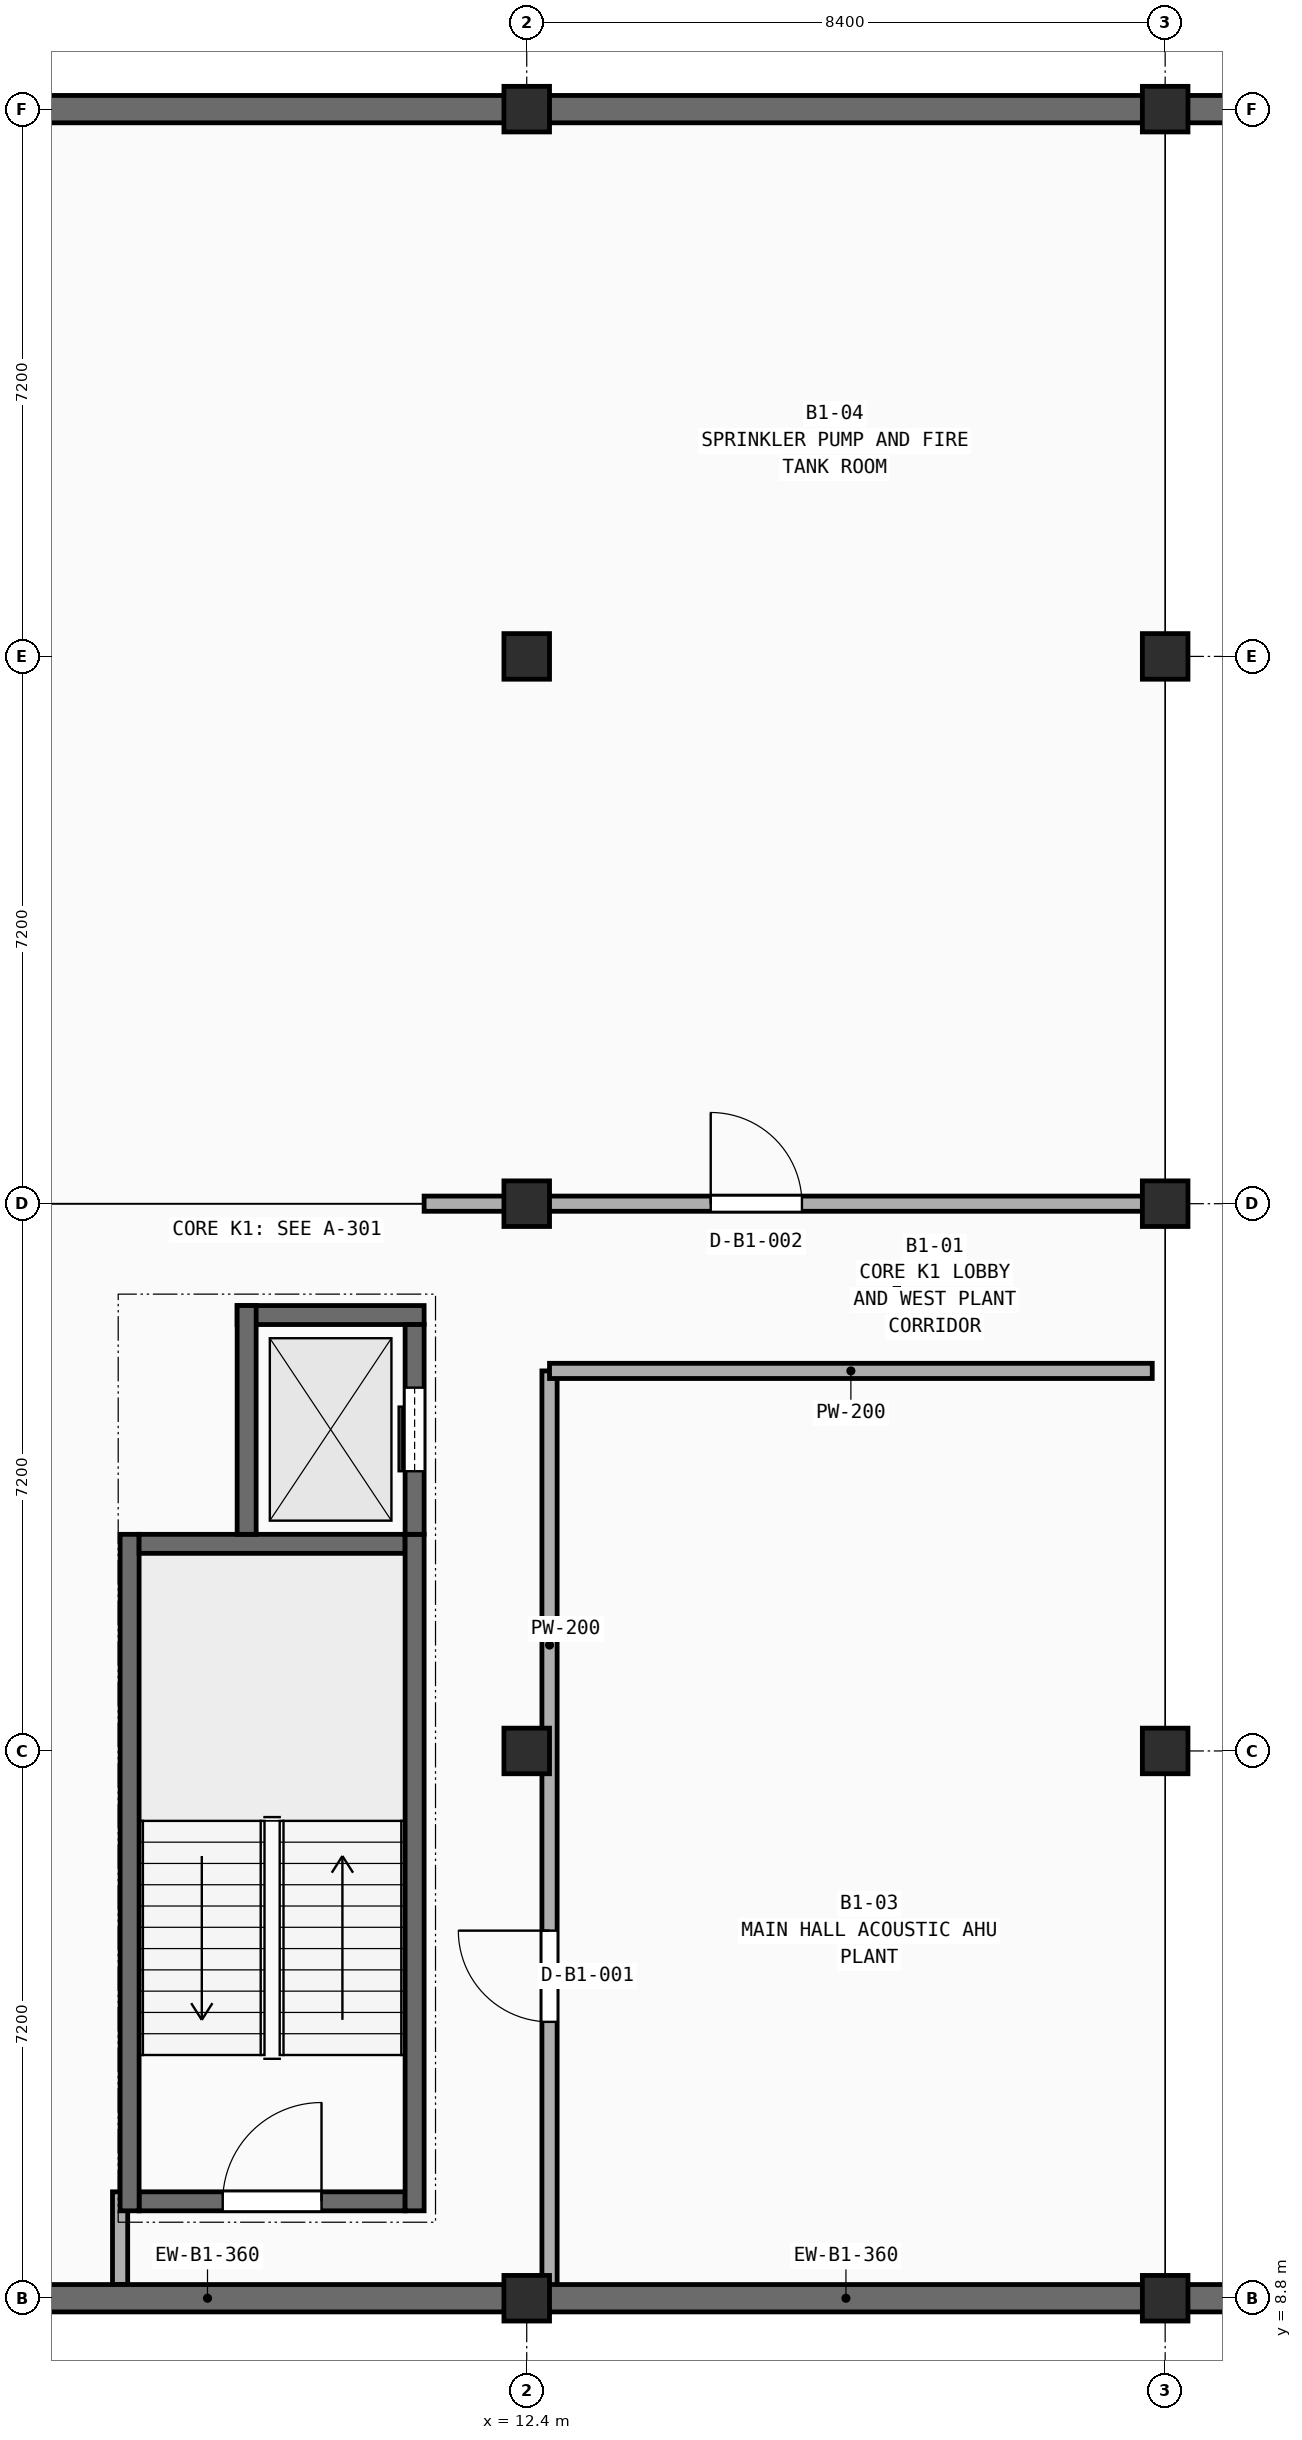
"""IFC4 building model, lengths in metres.
Left out: names, types, materials, properties, quantities, classifications, styles, units other than length and angle.
Written with IfcOpenShell. Run it as: python <this file> out.ifc"""

import sys

from ifc_helpers import new_model, si_unit, direction, frame, frame_2d, origin, origin_2d, place, context, subcontext, project, spatial, rectangle, extrude, element, fill, save


model = new_model("IFC4")
c1 = context("Model", 3, precision=1e-05, world=origin(), true_north=direction((0.0, 1.0)))
c2 = subcontext(c1, "Body", "Model", "MODEL_VIEW")
j1 = project(units=[si_unit("LENGTHUNIT", "METRE"), si_unit("PLANEANGLEUNIT", "RADIAN")], contexts=[c1])
p1 = place(None, origin())
s1 = spatial("IfcSite", under=j1, at=p1, CompositionType="ELEMENT")
p2 = place(p1, origin())
s2 = spatial("IfcBuilding", under=s1, at=p2, CompositionType="ELEMENT")
p3 = place(p2, frame((0.0, 0.0, -4.2)))
s3 = spatial("IfcBuildingStorey", under=s2, at=p3, CompositionType="ELEMENT", Elevation=-4.2)
for number, where, z_axis, x_axis in (
    (1, (12.4, 8.8, 0.0), (0.0, 0.0, 1.0), (1.0, 0.0, 0.0)),
    (2, (12.4, 16.0, 0.0), (0.0, 0.0, 1.0), (1.0, 0.0, 0.0)),
    (3, (12.4, 23.2, 0.0), (0.0, 0.0, 1.0), (1.0, 0.0, 0.0)),
    (4, (12.4, 30.4, 0.0), (0.0, 0.0, 1.0), (1.0, 0.0, 0.0)),
    (5, (12.4, 37.6, 0.0), (0.0, 0.0, 1.0), (1.0, 0.0, 0.0)),
    (6, (20.8, 8.8, 0.0), (0.0, 0.0, 1.0), (1.0, 0.0, 0.0)),
    (7, (20.8, 16.0, 0.0), (0.0, 0.0, 1.0), (1.0, 0.0, 0.0)),
    (8, (20.8, 23.2, 0.0), (0.0, 0.0, 1.0), (1.0, 0.0, 0.0)),
    (9, (20.8, 30.4, 0.0), (0.0, 0.0, 1.0), (1.0, 0.0, 0.0)),
    (10, (20.8, 37.6, 0.0), (0.0, 0.0, 1.0), (1.0, 0.0, 0.0)),
):
    element("IfcColumn", number, at=place(p3, frame(where, z_axis=z_axis, x_axis=x_axis)), inside=s3, PredefinedType="COLUMN", context=c2, shape_type="SweptSolid", body=[
        extrude(rectangle(XDim=0.6, YDim=0.6, at=origin_2d()), origin(), (0.0, 0.0, 1.0), 4.2),
    ])
p4 = place(p3, frame((7.05, 8.98, 0.0), z_axis=(0.0, 0.0, 1.0), x_axis=(0.0, 1.0, 0.0)))
e11 = element("IfcWall", 11, at=p4, inside=s3, PredefinedType="PARTITIONING", context=c2, shape_type="SweptSolid", body=[
    extrude(rectangle(XDim=1.22, YDim=0.2, at=frame_2d((0.61, 0.0))), origin(), (0.0, 0.0, 1.0), 3.54),
])
p5 = place(p3, frame((12.7, 8.97, 0.0), z_axis=(0.0, 0.0, 1.0), x_axis=(0.0, 1.0, 0.0)))
e12 = element("IfcWall", 12, at=p5, inside=s3, PredefinedType="PARTITIONING", context=c2, shape_type="SweptSolid", body=[
    extrude(rectangle(XDim=12.03, YDim=0.2, at=frame_2d((6.015, 0.0))), origin(), (0.0, 0.0, 1.0), 3.44),
])
p6 = place(p5, frame((3.466, 0.0, -0.01)))
e13 = element("IfcOpeningElement", 13, at=p6, cuts=e12, PredefinedType="OPENING", context=c2, shape_type="SweptSolid", body=[
    extrude(rectangle(XDim=1.2, YDim=2.21, at=frame_2d((0.6, 1.105))), frame((0.0, 0.11, 0.0), z_axis=(0.0, -1.0, 0.0), x_axis=(1.0, 0.0, 0.0)), (0.0, 0.0, 1.0), 0.22),
])
p7 = place(p3, frame((12.7, 21.0, 0.0), z_axis=(0.0, 0.0, 1.0), x_axis=(1.0, 0.0, 0.0)))
e14 = element("IfcWall", 14, at=p7, inside=s3, PredefinedType="PARTITIONING", context=c2, shape_type="SweptSolid", body=[
    extrude(rectangle(XDim=7.93, YDim=0.2, at=frame_2d((3.965, 0.0))), origin(), (0.0, 0.0, 1.0), 3.54),
])
p8 = place(p3, frame((11.05, 23.2, 0.0), z_axis=(0.0, 0.0, 1.0), x_axis=(1.0, 0.0, 0.0)))
e15 = element("IfcWall", 15, at=p8, inside=s3, PredefinedType="PARTITIONING", context=c2, shape_type="SweptSolid", body=[
    extrude(rectangle(XDim=9.58, YDim=0.2, at=frame_2d((4.79, 0.0))), origin(), (0.0, 0.0, 1.0), 3.44),
])
p9 = place(p8, frame((3.771, 0.0, -0.01)))
e16 = element("IfcOpeningElement", 16, at=p9, cuts=e15, PredefinedType="OPENING", context=c2, shape_type="SweptSolid", body=[
    extrude(rectangle(XDim=1.2, YDim=2.21, at=frame_2d((0.6, 1.105))), frame((0.0, 0.11, 0.0), z_axis=(0.0, -1.0, 0.0), x_axis=(1.0, 0.0, 0.0)), (0.0, 0.0, 1.0), 0.22),
])
p10 = place(p3, frame((4.0, 8.8, 0.0), z_axis=(0.0, 0.0, 1.0), x_axis=(1.0, 0.0, 0.0)))
e17 = element("IfcWall", 17, at=p10, inside=s3, PredefinedType="SOLIDWALL", context=c2, shape_type="SweptSolid", body=[
    extrude(rectangle(XDim=8.4, YDim=0.36, at=frame_2d((4.2, 0.0))), origin(), (0.0, 0.0, 1.0), 3.54),
])
p11 = place(p3, frame((12.4, 8.8, 0.0), z_axis=(0.0, 0.0, 1.0), x_axis=(1.0, 0.0, 0.0)))
e18 = element("IfcWall", 18, at=p11, inside=s3, PredefinedType="SOLIDWALL", context=c2, shape_type="SweptSolid", body=[
    extrude(rectangle(XDim=8.4, YDim=0.36, at=frame_2d((4.2, 0.0))), origin(), (0.0, 0.0, 1.0), 3.54),
])
p12 = place(p3, frame((20.8, 8.8, -0.4), z_axis=(0.0, 0.0, 1.0), x_axis=(1.0, 0.0, 0.0)))
e19 = element("IfcWall", 19, at=p12, inside=s3, PredefinedType="SOLIDWALL", context=c2, shape_type="SweptSolid", body=[
    extrude(rectangle(XDim=8.4, YDim=0.36, at=frame_2d((4.2, 0.0))), origin(), (0.0, 0.0, 1.0), 3.94),
])
p13 = place(p3, frame((4.0, 37.6, 0.0), z_axis=(0.0, 0.0, 1.0), x_axis=(1.0, 0.0, 0.0)))
e20 = element("IfcWall", 20, at=p13, inside=s3, PredefinedType="SOLIDWALL", context=c2, shape_type="SweptSolid", body=[
    extrude(rectangle(XDim=8.4, YDim=0.36, at=frame_2d((4.2, 0.0))), origin(), (0.0, 0.0, 1.0), 3.54),
])
p14 = place(p3, frame((12.4, 37.6, 0.0), z_axis=(0.0, 0.0, 1.0), x_axis=(1.0, 0.0, 0.0)))
e21 = element("IfcWall", 21, at=p14, inside=s3, PredefinedType="SOLIDWALL", context=c2, shape_type="SweptSolid", body=[
    extrude(rectangle(XDim=8.4, YDim=0.36, at=frame_2d((4.2, 0.0))), origin(), (0.0, 0.0, 1.0), 3.54),
])
p15 = place(p3, frame((20.8, 37.6, -0.4), z_axis=(0.0, 0.0, 1.0), x_axis=(1.0, 0.0, 0.0)))
e22 = element("IfcWall", 22, at=p15, inside=s3, PredefinedType="SOLIDWALL", context=c2, shape_type="SweptSolid", body=[
    extrude(rectangle(XDim=8.4, YDim=0.36, at=frame_2d((4.2, 0.0))), origin(), (0.0, 0.0, 1.0), 3.94),
])
p16 = place(p3, frame((7.3, 10.075, 0.0), z_axis=(0.0, 0.0, 1.0), x_axis=(1.0, 0.0, 0.0)))
e23 = element("IfcWall", 23, at=p16, inside=s3, PredefinedType="SHEAR", context=c2, shape_type="SweptSolid", body=[
    extrude(rectangle(XDim=3.5, YDim=0.25, at=frame_2d((1.75, 0.0))), origin(), (0.0, 0.0, 1.0), 4.2),
])
p17 = place(p16, frame((1.1, 0.0, -0.01)))
e24 = element("IfcOpeningElement", 24, at=p17, cuts=e23, PredefinedType="OPENING", context=c2, shape_type="SweptSolid", body=[
    extrude(rectangle(XDim=1.3, YDim=2.16, at=frame_2d((0.65, 1.08))), frame((0.0, 0.135, 0.0), z_axis=(0.0, -1.0, 0.0), x_axis=(1.0, 0.0, 0.0)), (0.0, 0.0, 1.0), 0.27),
])
p18 = place(p3, frame((7.175, 9.95, 0.0), z_axis=(0.0, 0.0, 1.0), x_axis=(0.0, 1.0, 0.0)))
e25 = element("IfcWall", 25, at=p18, inside=s3, PredefinedType="SHEAR", context=c2, shape_type="SweptSolid", body=[
    extrude(rectangle(XDim=8.9, YDim=0.25, at=frame_2d((4.45, 0.0))), origin(), (0.0, 0.0, 1.0), 4.2),
])
p19 = place(p3, frame((10.8, 18.725, 0.0), z_axis=(0.0, 0.0, 1.0), x_axis=(-1.0, 0.0, 0.0)))
e26 = element("IfcWall", 26, at=p19, inside=s3, PredefinedType="SHEAR", context=c2, shape_type="SweptSolid", body=[
    extrude(rectangle(XDim=3.5, YDim=0.25, at=frame_2d((1.75, 0.0))), origin(), (0.0, 0.0, 1.0), 4.2),
])
p20 = place(p3, frame((10.925, 9.95, 0.0), z_axis=(0.0, 0.0, 1.0), x_axis=(0.0, 1.0, 0.0)))
e27 = element("IfcWall", 27, at=p20, inside=s3, PredefinedType="SHEAR", context=c2, shape_type="SweptSolid", body=[
    extrude(rectangle(XDim=8.9, YDim=0.25, at=frame_2d((4.45, 0.0))), origin(), (0.0, 0.0, 1.0), 4.2),
])
p21 = place(p3, frame((8.59, 21.735, 0.0), z_axis=(0.0, 0.0, 1.0), x_axis=(1.0, 0.0, 0.0)))
e28 = element("IfcWall", 28, at=p21, inside=s3, PredefinedType="SHEAR", context=c2, shape_type="SweptSolid", body=[
    extrude(rectangle(XDim=2.46, YDim=0.25, at=frame_2d((1.23, 0.0))), origin(), (0.0, 0.0, 1.0), 4.2),
])
p22 = place(p3, frame((10.925, 18.85, 0.0), z_axis=(0.0, 0.0, 1.0), x_axis=(0.0, 1.0, 0.0)))
e29 = element("IfcWall", 29, at=p22, inside=s3, PredefinedType="SHEAR", context=c2, shape_type="SweptSolid", body=[
    extrude(rectangle(XDim=2.76, YDim=0.25, at=frame_2d((1.38, 0.0))), origin(), (0.0, 0.0, 1.0), 4.2),
])
p23 = place(p22, frame((0.83, 0.0, -0.01)))
e30 = element("IfcOpeningElement", 30, at=p23, cuts=e29, PredefinedType="OPENING", context=c2, shape_type="SweptSolid", body=[
    extrude(rectangle(XDim=1.1, YDim=2.16, at=frame_2d((0.55, 1.08))), frame((0.0, 0.135, 0.0), z_axis=(0.0, -1.0, 0.0), x_axis=(1.0, 0.0, 0.0)), (0.0, 0.0, 1.0), 0.27),
])
p24 = place(p3, frame((8.715, 18.85, 0.0), z_axis=(0.0, 0.0, 1.0), x_axis=(0.0, 1.0, 0.0)))
e31 = element("IfcWall", 31, at=p24, inside=s3, PredefinedType="SHEAR", context=c2, shape_type="SweptSolid", body=[
    extrude(rectangle(XDim=3.01, YDim=0.25, at=frame_2d((1.505, 0.0))), origin(), (0.0, 0.0, 1.0), 4.2),
])
p25 = place(p6, frame((0.0, 0.0, 0.01)))
e32 = element("IfcDoor", 32, at=p25, inside=s3, OperationType="SINGLE_SWING_RIGHT", PredefinedType="DOOR", context=c2, shape_type="SweptSolid", body=[
    extrude(rectangle(XDim=1.2, YDim=2.2, at=frame_2d((0.6, 1.1))), frame((0.0, 0.025, 0.0), z_axis=(0.0, -1.0, 0.0), x_axis=(1.0, 0.0, 0.0)), (0.0, 0.0, 1.0), 0.05),
])
fill(e13, e32)
p26 = place(p9, frame((0.0, 0.0, 0.01)))
e33 = element("IfcDoor", 33, at=p26, inside=s3, OperationType="SINGLE_SWING_LEFT", PredefinedType="DOOR", context=c2, shape_type="SweptSolid", body=[
    extrude(rectangle(XDim=1.2, YDim=2.2, at=frame_2d((0.6, 1.1))), frame((0.0, 0.025, 0.0), z_axis=(0.0, -1.0, 0.0), x_axis=(1.0, 0.0, 0.0)), (0.0, 0.0, 1.0), 0.05),
])
fill(e16, e33)
p27 = place(p17, frame((0.0, 0.0, 0.01)))
e34 = element("IfcDoor", 34, at=p27, inside=s3, OperationType="SINGLE_SWING_RIGHT", PredefinedType="DOOR", context=c2, shape_type="SweptSolid", body=[
    extrude(rectangle(XDim=1.3, YDim=2.15, at=frame_2d((0.65, 1.075))), frame((0.0, 0.025, 0.0), z_axis=(0.0, -1.0, 0.0), x_axis=(1.0, 0.0, 0.0)), (0.0, 0.0, 1.0), 0.05),
])
fill(e24, e34)
p28 = place(p23, frame((0.0, 0.0, 0.01)))
e35 = element("IfcDoor", 35, at=p28, inside=s3, OperationType="SLIDING_TO_LEFT", PredefinedType="DOOR", context=c2, shape_type="SweptSolid", body=[
    extrude(rectangle(XDim=1.1, YDim=2.15, at=frame_2d((0.55, 1.075))), frame((0.0, 0.025, 0.0), z_axis=(0.0, -1.0, 0.0), x_axis=(1.0, 0.0, 0.0)), (0.0, 0.0, 1.0), 0.05),
])
fill(e30, e35)
save(model, sys.argv[1])
